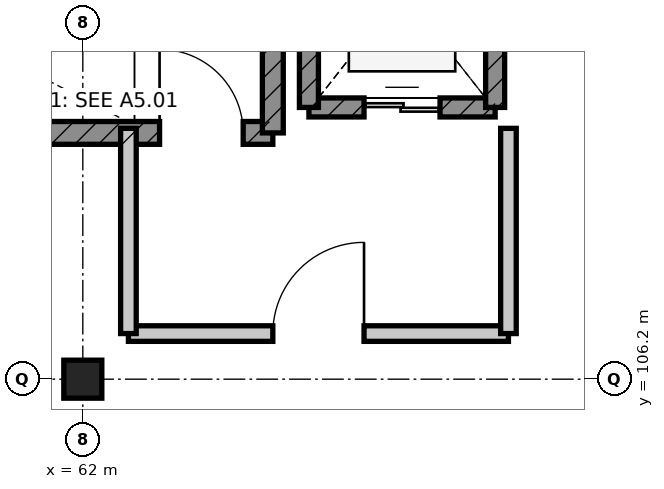
"""IFC4 building model, lengths in metres.
Left out: names, types, materials, properties, quantities, classifications, styles, units other than length and angle.
Written with IfcOpenShell. Run it as: python <this file> out.ifc"""

import sys

from ifc_helpers import new_model, si_unit, direction, frame, frame_2d, origin, origin_2d, place, context, subcontext, project, spatial, rectangle, extrude, element, fill, save


model = new_model("IFC4")
c1 = context("Model", 3, precision=1e-05, world=origin(), true_north=direction((0.0, 1.0)))
c2 = subcontext(c1, "Body", "Model", "MODEL_VIEW")
j1 = project(units=[si_unit("LENGTHUNIT", "METRE"), si_unit("PLANEANGLEUNIT", "RADIAN")], contexts=[c1])
p1 = place(None, origin())
s1 = spatial("IfcSite", under=j1, at=p1, CompositionType="ELEMENT")
p2 = place(p1, origin())
s2 = spatial("IfcBuilding", under=s1, at=p2, CompositionType="ELEMENT")
p3 = place(p2, frame((0.0, 0.0, 44.4)))
s3 = spatial("IfcBuildingStorey", under=s2, at=p3, CompositionType="ELEMENT", Elevation=44.4)
p4 = place(p3, frame((62.0, 106.2, 0.0), z_axis=(0.0, 0.0, 1.0), x_axis=(1.0, 0.0, 0.0)))
e1 = element("IfcColumn", 1, at=p4, inside=s3, PredefinedType="COLUMN", context=c2, shape_type="SweptSolid", body=[
    extrude(rectangle(XDim=0.5, YDim=0.5, at=origin_2d()), origin(), (0.0, 0.0, 1.0), 4.2),
])
p5 = place(p3, frame((56.1, 109.44, 0.0), z_axis=(0.0, 0.0, 1.0), x_axis=(1.0, 0.0, 0.0)))
e2 = element("IfcWall", 2, at=p5, inside=s3, PredefinedType="SHEAR", context=c2, shape_type="SweptSolid", body=[
    extrude(rectangle(XDim=8.4, YDim=0.3, at=frame_2d((4.2, 0.0))), origin(), (0.0, 0.0, 1.0), 3.95),
])
p6 = place(p5, frame((6.91, 0.0, 0.0)))
e3 = element("IfcOpeningElement", 3, at=p6, cuts=e2, PredefinedType="OPENING", context=c2, shape_type="SweptSolid", body=[
    extrude(rectangle(XDim=1.1, YDim=2.1, at=frame_2d((0.55, 1.05))), frame((0.0, 0.16, 0.0), z_axis=(0.0, -1.0, 0.0), x_axis=(1.0, 0.0, 0.0)), (0.0, 0.0, 1.0), 0.32),
])
p7 = place(p3, frame((64.5, 109.44, 0.0), z_axis=(0.0, 0.0, 1.0), x_axis=(0.0, 1.0, 0.0)))
e4 = element("IfcWall", 4, at=p7, inside=s3, PredefinedType="SHEAR", context=c2, shape_type="SweptSolid", body=[
    extrude(rectangle(XDim=3.56, YDim=0.275, at=frame_2d((1.78, 0.0))), origin(), (0.0, 0.0, 1.0), 3.95),
])
p8 = place(p3, frame((64.975, 109.775, 0.0), z_axis=(0.0, 0.0, 1.0), x_axis=(1.0, 0.0, 0.0)))
e5 = element("IfcWall", 5, at=p8, inside=s3, PredefinedType="SHEAR", context=c2, shape_type="SweptSolid", body=[
    extrude(rectangle(XDim=2.45, YDim=0.25, at=frame_2d((1.225, 0.0))), origin(), (0.0, 0.0, 1.0), 3.95),
])
p9 = place(p8, frame((0.725, 0.0, 0.0)))
e6 = element("IfcOpeningElement", 6, at=p9, cuts=e5, PredefinedType="OPENING", context=c2, shape_type="SweptSolid", body=[
    extrude(rectangle(XDim=1.0, YDim=2.15, at=frame_2d((0.5, 1.075))), frame((0.0, 0.135, 0.0), z_axis=(0.0, -1.0, 0.0), x_axis=(1.0, 0.0, 0.0)), (0.0, 0.0, 1.0), 0.27),
])
for number, where, z_axis, x_axis in (
    (7, (67.425, 109.775, 0.0), (0.0, 0.0, 1.0), (0.0, 1.0, 0.0)),
    (8, (64.975, 112.825, 0.0), (0.0, 0.0, 1.0), (0.0, -1.0, 0.0)),
):
    element("IfcWall", number, at=place(p3, frame(where, z_axis=z_axis, x_axis=x_axis)), inside=s3, PredefinedType="SHEAR", context=c2, shape_type="SweptSolid", body=[
        extrude(rectangle(XDim=3.05, YDim=0.25, at=frame_2d((1.525, 0.0))), origin(), (0.0, 0.0, 1.0), 3.95),
    ])
p10 = place(p3, frame((62.6, 106.8, 0.0), z_axis=(0.0, 0.0, 1.0), x_axis=(1.0, 0.0, 0.0)))
e9 = element("IfcWall", 9, at=p10, inside=s3, PredefinedType="PARTITIONING", context=c2, shape_type="SweptSolid", body=[
    extrude(rectangle(XDim=5.0, YDim=0.205, at=frame_2d((2.5, 0.0))), origin(), (0.0, 0.0, 1.0), 3.95),
])
p11 = place(p10, frame((1.9, 0.0, 0.0)))
e10 = element("IfcOpeningElement", 10, at=p11, cuts=e9, PredefinedType="OPENING", context=c2, shape_type="SweptSolid", body=[
    extrude(rectangle(XDim=1.2, YDim=2.1, at=frame_2d((0.6, 1.05))), frame((0.0, 0.113, 0.0), z_axis=(0.0, -1.0, 0.0), x_axis=(1.0, 0.0, 0.0)), (0.0, 0.0, 1.0), 0.225),
])
for number, where, z_axis, x_axis in (
    (11, (67.6, 106.8, 0.0), (0.0, 0.0, 1.0), (0.0, 1.0, 0.0)),
    (12, (62.6, 109.5, 0.0), (0.0, 0.0, 1.0), (0.0, -1.0, 0.0)),
):
    element("IfcWall", number, at=place(p3, frame(where, z_axis=z_axis, x_axis=x_axis)), inside=s3, PredefinedType="PARTITIONING", context=c2, shape_type="SweptSolid", body=[
        extrude(rectangle(XDim=2.7, YDim=0.205, at=frame_2d((1.35, 0.0))), origin(), (0.0, 0.0, 1.0), 3.95),
    ])
p12 = place(p6, origin())
e13 = element("IfcDoor", 13, at=p12, inside=s3, OperationType="SINGLE_SWING_LEFT", PredefinedType="DOOR", context=c2, shape_type="SweptSolid", body=[
    extrude(rectangle(XDim=1.1, YDim=2.1, at=frame_2d((0.55, 1.05))), frame((0.0, 0.025, 0.0), z_axis=(0.0, -1.0, 0.0), x_axis=(1.0, 0.0, 0.0)), (0.0, 0.0, 1.0), 0.05),
])
fill(e3, e13)
p13 = place(p9, origin())
e14 = element("IfcDoor", 14, at=p13, inside=s3, OperationType="DOUBLE_DOOR_SLIDING", PredefinedType="DOOR", context=c2, shape_type="SweptSolid", body=[
    extrude(rectangle(XDim=1.0, YDim=2.15, at=frame_2d((0.5, 1.075))), frame((0.0, 0.025, 0.0), z_axis=(0.0, -1.0, 0.0), x_axis=(1.0, 0.0, 0.0)), (0.0, 0.0, 1.0), 0.05),
])
fill(e6, e14)
p14 = place(p11, origin())
e15 = element("IfcDoor", 15, at=p14, inside=s3, OperationType="SINGLE_SWING_RIGHT", PredefinedType="DOOR", context=c2, shape_type="SweptSolid", body=[
    extrude(rectangle(XDim=1.2, YDim=2.1, at=frame_2d((0.6, 1.05))), frame((0.0, 0.025, 0.0), z_axis=(0.0, -1.0, 0.0), x_axis=(1.0, 0.0, 0.0)), (0.0, 0.0, 1.0), 0.05),
])
fill(e10, e15)
save(model, sys.argv[1])
